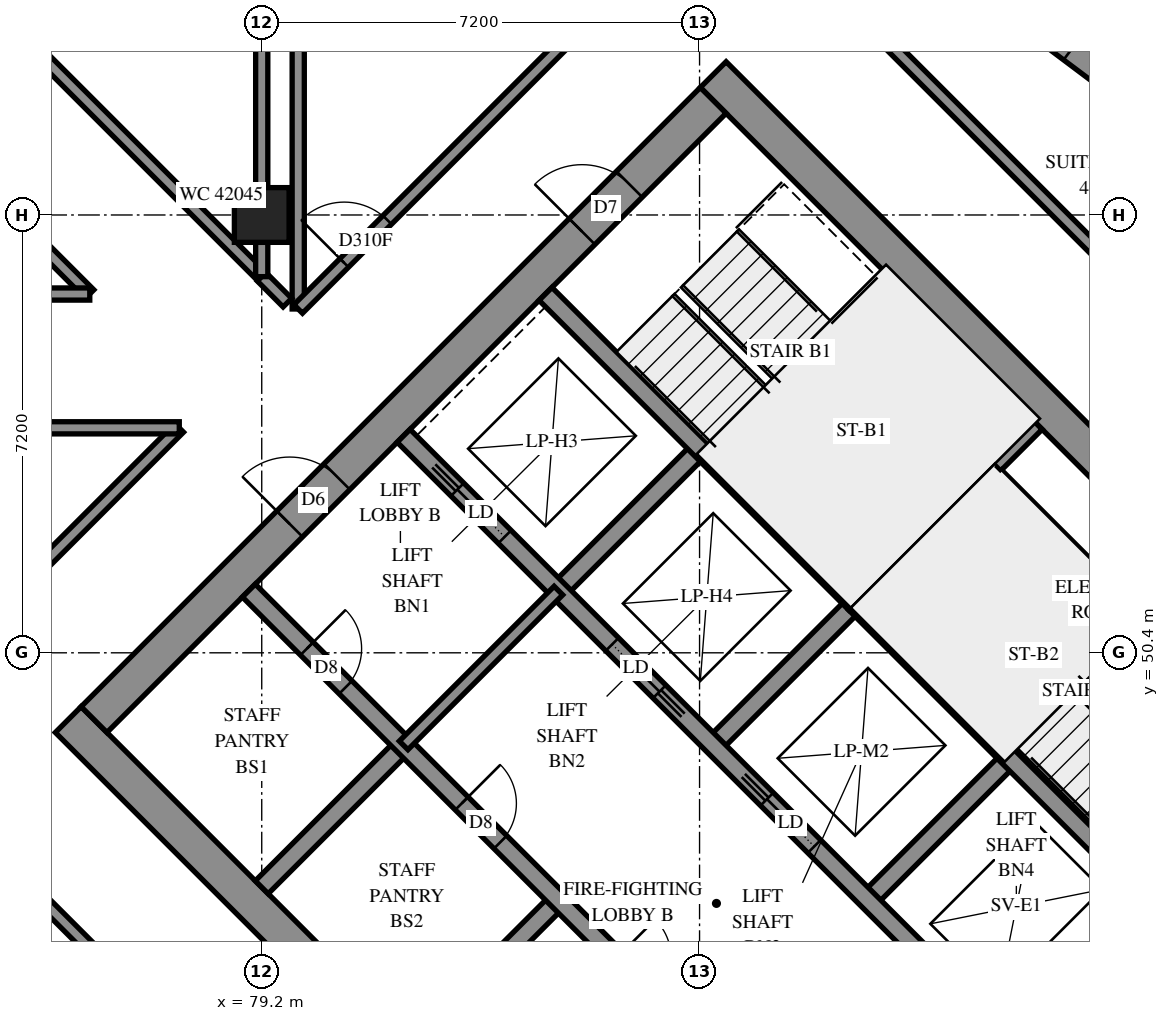
"""IFC4 building model, lengths in metres.
Left out: names, types, materials, properties, quantities, classifications, styles, units other than length and angle.
Written with IfcOpenShell. Run it as: python <this file> out.ifc"""

import sys

from ifc_helpers import new_model, si_unit, direction, frame, frame_2d, origin, origin_2d, place, context, subcontext, project, spatial, polyline, rectangle, outline, extrude, element, fill, save


model = new_model("IFC4")
c1 = context("Model", 3, precision=1e-05, world=origin(), true_north=direction((0.0, 1.0)))
c2 = subcontext(c1, "Body", "Model", "MODEL_VIEW")
j1 = project(units=[si_unit("LENGTHUNIT", "METRE"), si_unit("PLANEANGLEUNIT", "RADIAN")], contexts=[c1])
p1 = place(None, origin())
s1 = spatial("IfcSite", under=j1, at=p1, CompositionType="ELEMENT")
p2 = place(p1, origin())
s2 = spatial("IfcBuilding", under=s1, at=p2, CompositionType="ELEMENT")
p3 = place(p2, frame((0.0, 0.0, 155.8)))
s3 = spatial("IfcBuildingStorey", under=s2, at=p3, CompositionType="ELEMENT", Elevation=155.8)
p4 = place(p3, frame((79.2, 57.6, 0.0), z_axis=(0.0, 0.0, 1.0), x_axis=(1.0, 0.0, 0.0)))
e1 = element("IfcColumn", 1, at=p4, inside=s3, PredefinedType="COLUMN", context=c2, shape_type="SweptSolid", body=[
    extrude(rectangle(XDim=0.9, YDim=0.9, at=origin_2d()), origin(), (0.0, 0.0, 1.0), 3.1),
])
p5 = place(p3, frame((76.018, 49.302, -0.3), z_axis=(0.0, 0.0, 1.0), x_axis=(0.7071067812, -0.7071067812, 0.0)))
e2 = element("IfcWall", 2, at=p5, inside=s3, PredefinedType="SHEAR", context=c2, shape_type="SweptSolid", body=[
    extrude(rectangle(XDim=15.6, YDim=0.6, at=frame_2d((7.8, 0.0))), origin(), (0.0, 0.0, 1.0), 2.7),
])
p6 = place(p3, frame((86.625, 59.908, -0.3), z_axis=(0.0, 0.0, 1.0), x_axis=(0.7071067812, -0.7071067812, 0.0)))
e3 = element("IfcWall", 3, at=p6, inside=s3, PredefinedType="SHEAR", context=c2, shape_type="SweptSolid", body=[
    extrude(rectangle(XDim=15.6, YDim=0.6, at=frame_2d((7.8, 0.0))), origin(), (0.0, 0.0, 1.0), 2.7),
])
p7 = place(p6, frame((10.6, 0.0, 0.3)))
e4 = element("IfcOpeningElement", 4, at=p7, cuts=e3, PredefinedType="OPENING", context=c2, shape_type="SweptSolid", body=[
    extrude(rectangle(XDim=0.8, YDim=2.1, at=frame_2d((0.4, 1.05))), frame((0.0, 0.31, 0.0), z_axis=(0.0, -1.0, 0.0), x_axis=(1.0, 0.0, 0.0)), (0.0, 0.0, 1.0), 0.62),
])
p8 = place(p3, frame((76.442, 49.302, -0.3), z_axis=(0.0, 0.0, 1.0), x_axis=(0.7071067812, 0.7071067812, 0.0)))
e5 = element("IfcWall", 5, at=p8, inside=s3, PredefinedType="SHEAR", context=c2, shape_type="SweptSolid", body=[
    extrude(rectangle(XDim=14.4, YDim=0.6, at=frame_2d((7.2, 0.0))), origin(), (0.0, 0.0, 1.0), 2.7),
])
p9 = place(p8, frame((4.55, 0.0, 0.3)))
e6 = element("IfcOpeningElement", 6, at=p9, cuts=e5, PredefinedType="OPENING", context=c2, shape_type="SweptSolid", body=[
    extrude(rectangle(XDim=1.1, YDim=2.1, at=frame_2d((0.55, 1.05))), frame((0.0, 0.31, 0.0), z_axis=(0.0, -1.0, 0.0), x_axis=(1.0, 0.0, 0.0)), (0.0, 0.0, 1.0), 0.62),
])
p10 = place(p8, frame((11.35, 0.0, 0.3)))
e7 = element("IfcOpeningElement", 7, at=p10, cuts=e5, PredefinedType="OPENING", context=c2, shape_type="SweptSolid", body=[
    extrude(rectangle(XDim=1.1, YDim=2.1, at=frame_2d((0.55, 1.05))), frame((0.0, 0.31, 0.0), z_axis=(0.0, -1.0, 0.0), x_axis=(1.0, 0.0, 0.0)), (0.0, 0.0, 1.0), 0.62),
])
p11 = place(p3, frame((87.049, 38.695, -0.3), z_axis=(0.0, 0.0, 1.0), x_axis=(0.7071067812, 0.7071067812, 0.0)))
e8 = element("IfcWall", 8, at=p11, inside=s3, PredefinedType="SHEAR", context=c2, shape_type="SweptSolid", body=[
    extrude(rectangle(XDim=14.4, YDim=0.6, at=frame_2d((7.2, 0.0))), origin(), (0.0, 0.0, 1.0), 2.7),
])
p12 = place(p11, frame((4.55, 0.0, 0.3)))
e9 = element("IfcOpeningElement", 9, at=p12, cuts=e8, PredefinedType="OPENING", context=c2, shape_type="SweptSolid", body=[
    extrude(rectangle(XDim=1.1, YDim=2.1, at=frame_2d((0.55, 1.05))), frame((0.0, 0.31, 0.0), z_axis=(0.0, -1.0, 0.0), x_axis=(1.0, 0.0, 0.0)), (0.0, 0.0, 1.0), 0.62),
])
p13 = place(p11, frame((11.35, 0.0, 0.3)))
e10 = element("IfcOpeningElement", 10, at=p13, cuts=e8, PredefinedType="OPENING", context=c2, shape_type="SweptSolid", body=[
    extrude(rectangle(XDim=1.1, YDim=2.1, at=frame_2d((0.55, 1.05))), frame((0.0, 0.31, 0.0), z_axis=(0.0, -1.0, 0.0), x_axis=(1.0, 0.0, 0.0)), (0.0, 0.0, 1.0), 0.62),
])
for number, where, z_axis, x_axis in (
    (11, (79.2, 46.544, 0.0), (0.0, 0.0, 1.0), (0.707, 0.707, 0.0)),
    (12, (84.079, 51.423, 0.0), (0.0, 0.0, 1.0), (0.707, 0.707, 0.0)),
):
    element("IfcWall", number, at=place(p3, frame(where, z_axis=z_axis, x_axis=x_axis)), inside=s3, PredefinedType="SOLIDWALL", context=c2, shape_type="SweptSolid", body=[
        extrude(rectangle(XDim=3.3, YDim=0.3, at=frame_2d((1.65, 0.0))), origin(), (0.0, 0.0, 1.0), 3.1),
    ])
p14 = place(p3, frame((81.746, 43.999, 0.0), z_axis=(0.0, 0.0, 1.0), x_axis=(0.7071067812, 0.7071067812, 0.0)))
e13 = element("IfcWall", 13, at=p14, inside=s3, PredefinedType="SOLIDWALL", context=c2, shape_type="SweptSolid", body=[
    extrude(rectangle(XDim=3.3, YDim=0.3, at=frame_2d((1.65, 0.0))), origin(), (0.0, 0.0, 1.0), 3.1),
])
for number, where, z_axis, x_axis in (
    (14, (86.625, 48.878, 0.0), (0.0, 0.0, 1.0), (0.707, 0.707, 0.0)),
    (15, (89.17, 46.332, 0.0), (0.0, 0.0, 1.0), (0.707, 0.707, 0.0)),
):
    element("IfcWall", number, at=place(p3, frame(where, z_axis=z_axis, x_axis=x_axis)), inside=s3, PredefinedType="SOLIDWALL", context=c2, shape_type="SweptSolid", body=[
        extrude(rectangle(XDim=3.3, YDim=0.3, at=frame_2d((1.65, 0.0))), origin(), (0.0, 0.0, 1.0), 3.1),
    ])
p15 = place(p3, frame((78.988, 51.423, 0.0), z_axis=(0.0, 0.0, 1.0), x_axis=(0.7071067812, -0.7071067812, 0.0)))
e16 = element("IfcWall", 16, at=p15, inside=s3, PredefinedType="SOLIDWALL", context=c2, shape_type="SweptSolid", body=[
    extrude(rectangle(XDim=14.4, YDim=0.3, at=frame_2d((7.2, 0.0))), origin(), (0.0, 0.0, 1.0), 3.1),
])
p16 = place(p15, frame((1.35, 0.0, 0.0)))
e17 = element("IfcOpeningElement", 17, at=p16, cuts=e16, PredefinedType="OPENING", context=c2, shape_type="SweptSolid", body=[
    extrude(rectangle(XDim=0.9, YDim=2.1, at=frame_2d((0.45, 1.05))), frame((0.0, 0.16, 0.0), z_axis=(0.0, -1.0, 0.0), x_axis=(1.0, 0.0, 0.0)), (0.0, 0.0, 1.0), 0.32),
])
p17 = place(p15, frame((4.95, 0.0, 0.0)))
e18 = element("IfcOpeningElement", 18, at=p17, cuts=e16, PredefinedType="OPENING", context=c2, shape_type="SweptSolid", body=[
    extrude(rectangle(XDim=0.9, YDim=2.1, at=frame_2d((0.45, 1.05))), frame((0.0, 0.16, 0.0), z_axis=(0.0, -1.0, 0.0), x_axis=(1.0, 0.0, 0.0)), (0.0, 0.0, 1.0), 0.32),
])
p18 = place(p15, frame((8.55, 0.0, 0.0)))
e19 = element("IfcOpeningElement", 19, at=p18, cuts=e16, PredefinedType="OPENING", context=c2, shape_type="SweptSolid", body=[
    extrude(rectangle(XDim=0.9, YDim=2.1, at=frame_2d((0.45, 1.05))), frame((0.0, 0.16, 0.0), z_axis=(0.0, -1.0, 0.0), x_axis=(1.0, 0.0, 0.0)), (0.0, 0.0, 1.0), 0.32),
])
p19 = place(p15, frame((12.05, 0.0, 0.0)))
e20 = element("IfcOpeningElement", 20, at=p19, cuts=e16, PredefinedType="OPENING", context=c2, shape_type="SweptSolid", body=[
    extrude(rectangle(XDim=1.1, YDim=2.1, at=frame_2d((0.55, 1.05))), frame((0.0, 0.16, 0.0), z_axis=(0.0, -1.0, 0.0), x_axis=(1.0, 0.0, 0.0)), (0.0, 0.0, 1.0), 0.32),
])
p20 = place(p3, frame((81.534, 53.969, 0.0), z_axis=(0.0, 0.0, 1.0), x_axis=(0.707103309, -0.7071102534, 0.0)))
e21 = element("IfcWall", 21, at=p20, inside=s3, PredefinedType="SOLIDWALL", context=c2, shape_type="SweptSolid", body=[
    extrude(rectangle(XDim=14.4, YDim=0.3, at=frame_2d((7.2, 0.0))), origin(), (0.0, 0.0, 1.0), 3.1),
])
p21 = place(p20, frame((1.25, 0.0, 0.0)))
e22 = element("IfcOpeningElement", 22, at=p21, cuts=e21, PredefinedType="OPENING", context=c2, shape_type="SweptSolid", body=[
    extrude(rectangle(XDim=1.1, YDim=2.1, at=frame_2d((0.55, 1.05))), frame((0.0, 0.16, 0.0), z_axis=(0.0, -1.0, 0.0), x_axis=(1.0, 0.0, 0.0)), (0.0, 0.0, 1.0), 0.32),
])
p22 = place(p20, frame((4.85, 0.0, 0.0)))
e23 = element("IfcOpeningElement", 23, at=p22, cuts=e21, PredefinedType="OPENING", context=c2, shape_type="SweptSolid", body=[
    extrude(rectangle(XDim=1.1, YDim=2.1, at=frame_2d((0.55, 1.05))), frame((0.0, 0.16, 0.0), z_axis=(0.0, -1.0, 0.0), x_axis=(1.0, 0.0, 0.0)), (0.0, 0.0, 1.0), 0.32),
])
p23 = place(p20, frame((8.45, 0.0, 0.0)))
e24 = element("IfcOpeningElement", 24, at=p23, cuts=e21, PredefinedType="OPENING", context=c2, shape_type="SweptSolid", body=[
    extrude(rectangle(XDim=1.1, YDim=2.1, at=frame_2d((0.55, 1.05))), frame((0.0, 0.16, 0.0), z_axis=(0.0, -1.0, 0.0), x_axis=(1.0, 0.0, 0.0)), (0.0, 0.0, 1.0), 0.32),
])
p24 = place(p20, frame((12.05, 0.0, 0.0)))
e25 = element("IfcOpeningElement", 25, at=p24, cuts=e21, PredefinedType="OPENING", context=c2, shape_type="SweptSolid", body=[
    extrude(rectangle(XDim=1.1, YDim=2.1, at=frame_2d((0.55, 1.05))), frame((0.0, 0.16, 0.0), z_axis=(0.0, -1.0, 0.0), x_axis=(1.0, 0.0, 0.0)), (0.0, 0.0, 1.0), 0.32),
])
for number, where, z_axis, x_axis in (
    (26, (83.867, 56.302, 0.0), (0.0, 0.0, 1.0), (0.707, -0.707, 0.0)),
    (27, (88.958, 51.211, 0.0), (0.0, 0.0, 1.0), (0.707, -0.707, 0.0)),
):
    element("IfcWall", number, at=place(p3, frame(where, z_axis=z_axis, x_axis=x_axis)), inside=s3, PredefinedType="SOLIDWALL", context=c2, shape_type="SweptSolid", body=[
        extrude(rectangle(XDim=7.2, YDim=0.3, at=frame_2d((3.6, 0.0))), origin(), (0.0, 0.0, 1.0), 3.1),
    ])
p25 = place(p3, frame((88.958, 51.211, 0.0), z_axis=(0.0, 0.0, 1.0), x_axis=(0.7071067812, 0.7071067812, 0.0)))
e28 = element("IfcWall", 28, at=p25, inside=s3, PredefinedType="SOLIDWALL", context=c2, shape_type="SweptSolid", body=[
    extrude(rectangle(XDim=4.2, YDim=0.3, at=frame_2d((2.1, 0.0))), origin(), (0.0, 0.0, 1.0), 3.1),
])
p26 = place(p3, frame((93.877, 59.344, 0.0), z_axis=(0.0, 0.0, 1.0), x_axis=(-0.7998874743, 0.600150005, 0.0)))
e29 = element("IfcWall", 29, at=p26, inside=s3, PredefinedType="SOLIDWALL", context=c2, shape_type="SweptSolid", body=[
    extrude(outline(polyline([(-0.036, -0.25), (3.377, -0.25), (3.449, 0.25), (0.036, 0.25), (-0.036, -0.25)])), origin(), (0.0, 0.0, 1.0), 3.1),
])
p27 = place(p26, frame((1.677, 0.0, 0.45)))
e30 = element("IfcOpeningElement", 30, at=p27, cuts=e29, PredefinedType="OPENING", context=c2, shape_type="SweptSolid", body=[
    extrude(rectangle(XDim=1.2, YDim=2.5, at=frame_2d((0.6, 1.25))), frame((0.0, 0.26, 0.0), z_axis=(0.0, -1.0, 0.0), x_axis=(1.0, 0.0, 0.0)), (0.0, 0.0, 1.0), 0.52),
])
p28 = place(p3, frame((91.313, 53.354, 0.0), z_axis=(0.0, 0.0, 1.0), x_axis=(0.7071067812, -0.7071067812, 0.0)))
e31 = element("IfcWall", 31, at=p28, inside=s3, PredefinedType="PARTITIONING", context=c2, shape_type="SweptSolid", body=[
    extrude(rectangle(XDim=5.65, YDim=0.15, at=frame_2d((2.825, 0.0))), origin(), (0.0, 0.0, 1.0), 3.1),
])
p29 = place(p3, frame((81.534, 48.878, 0.0), z_axis=(0.0, 0.0, 1.0), x_axis=(0.707092892, 0.7071206701, 0.0)))
e32 = element("IfcWall", 32, at=p29, inside=s3, PredefinedType="PARTITIONING", context=c2, shape_type="SweptSolid", body=[
    extrude(rectangle(XDim=3.6, YDim=0.2, at=frame_2d((1.8, 0.0))), origin(), (0.0, 0.0, 1.0), 3.1),
])
p30 = place(p3, frame((86.841, 63.093, 0.0), z_axis=(0.0, 0.0, 1.0), x_axis=(0.7071067812, -0.7071067812, 0.0)))
e33 = element("IfcWall", 33, at=p30, inside=s3, PredefinedType="PARTITIONING", context=c2, shape_type="SweptSolid", body=[
    extrude(rectangle(XDim=12.239, YDim=0.2, at=frame_2d((6.119, 0.0))), origin(), (0.0, 0.0, 1.0), 3.1),
])
p31 = place(p30, frame((10.634, 0.0, 0.0)))
e34 = element("IfcOpeningElement", 34, at=p31, cuts=e33, PredefinedType="OPENING", context=c2, shape_type="SweptSolid", body=[
    extrude(rectangle(XDim=0.9, YDim=2.1, at=frame_2d((0.45, 1.05))), frame((0.0, 0.11, 0.0), z_axis=(0.0, -1.0, 0.0), x_axis=(1.0, 0.0, 0.0)), (0.0, 0.0, 1.0), 0.22),
])
p32 = place(p3, frame((79.8, 56.054, 0.0), z_axis=(0.0, 0.0, 1.0), x_axis=(0.0, 1.0, 0.0)))
e35 = element("IfcWall", 35, at=p32, inside=s3, PredefinedType="PARTITIONING", context=c2, shape_type="SweptSolid", body=[
    extrude(rectangle(XDim=11.454, YDim=0.2, at=frame_2d((5.727, 0.0))), origin(), (0.0, 0.0, 1.0), 3.1),
])
p33 = place(p3, frame((79.799, 56.055, 0.0), z_axis=(0.0, 0.0, 1.0), x_axis=(0.7071067812, 0.7071067812, 0.0)))
e36 = element("IfcWall", 36, at=p33, inside=s3, PredefinedType="PARTITIONING", context=c2, shape_type="SweptSolid", body=[
    extrude(rectangle(XDim=9.95, YDim=0.2, at=frame_2d((4.975, 0.0))), origin(), (0.0, 0.0, 1.0), 3.1),
])
p34 = place(p33, frame((1.071, 0.0, 0.0)))
e37 = element("IfcOpeningElement", 37, at=p34, cuts=e36, PredefinedType="OPENING", context=c2, shape_type="SweptSolid", body=[
    extrude(rectangle(XDim=1.0, YDim=2.1, at=frame_2d((0.5, 1.05))), frame((0.0, 0.11, 0.0), z_axis=(0.0, -1.0, 0.0), x_axis=(1.0, 0.0, 0.0)), (0.0, 0.0, 1.0), 0.22),
])
p35 = place(p3, frame((74.903, 60.889, 0.0), z_axis=(0.0, 0.0, 1.0), x_axis=(0.7071067812, -0.7071067812, 0.0)))
e38 = element("IfcWall", 38, at=p35, inside=s3, PredefinedType="PARTITIONING", context=c2, shape_type="SweptSolid", body=[
    extrude(rectangle(XDim=6.081, YDim=0.2, at=frame_2d((3.041, 0.0))), origin(), (0.0, 0.0, 1.0), 3.1),
])
p36 = place(p3, frame((74.223, 47.697, 0.0), z_axis=(0.0, 0.0, 1.0), x_axis=(0.7071067812, -0.7071067812, 0.0)))
e39 = element("IfcWall", 39, at=p36, inside=s3, PredefinedType="PARTITIONING", context=c2, shape_type="SweptSolid", body=[
    extrude(rectangle(XDim=4.63, YDim=0.2, at=frame_2d((2.315, 0.0))), origin(), (0.0, 0.0, 1.0), 3.1),
])
p37 = place(p36, frame((0.434, 0.0, 0.0)))
e40 = element("IfcOpeningElement", 40, at=p37, cuts=e39, PredefinedType="OPENING", context=c2, shape_type="SweptSolid", body=[
    extrude(rectangle(XDim=1.0, YDim=2.1, at=frame_2d((0.5, 1.05))), frame((0.0, 0.11, 0.0), z_axis=(0.0, -1.0, 0.0), x_axis=(1.0, 0.0, 0.0)), (0.0, 0.0, 1.0), 0.22),
])
p38 = place(p3, frame((74.701, 50.957, 0.0), z_axis=(0.0, 0.0, 1.0), x_axis=(0.7071067812, 0.7071067812, 0.0)))
e41 = element("IfcWall", 41, at=p38, inside=s3, PredefinedType="PARTITIONING", context=c2, shape_type="SweptSolid", body=[
    extrude(rectangle(XDim=4.444, YDim=0.2, at=frame_2d((2.222, 0.0))), origin(), (0.0, 0.0, 1.0), 3.1),
])
p39 = place(p3, frame((79.2, 58.05, 0.0), z_axis=(0.0, 0.0, 1.0), x_axis=(0.0, 1.0, 0.0)))
e42 = element("IfcWall", 42, at=p39, inside=s3, PredefinedType="PARTITIONING", context=c2, shape_type="SweptSolid", body=[
    extrude(rectangle(XDim=3.25, YDim=0.2, at=frame_2d((1.625, 0.0))), origin(), (0.0, 0.0, 1.0), 3.1),
])
p40 = place(p3, frame((74.702, 54.1, 0.0), z_axis=(0.0, 0.0, 1.0), x_axis=(1.0, 0.0, 0.0)))
e43 = element("IfcWall", 43, at=p40, inside=s3, PredefinedType="PARTITIONING", context=c2, shape_type="SweptSolid", body=[
    extrude(rectangle(XDim=3.142, YDim=0.2, at=frame_2d((1.571, 0.0))), origin(), (0.0, 0.0, 1.0), 3.1),
])
p41 = place(p3, frame((74.699, 57.969, 0.0), z_axis=(0.0, 0.0, 1.0), x_axis=(0.7071067812, -0.7071067812, 0.0)))
e44 = element("IfcWall", 44, at=p41, inside=s3, PredefinedType="PARTITIONING", context=c2, shape_type="SweptSolid", body=[
    extrude(rectangle(XDim=2.362, YDim=0.2, at=frame_2d((1.181, 0.0))), origin(), (0.0, 0.0, 1.0), 3.1),
])
p42 = place(p3, frame((74.702, 56.3, 0.0), z_axis=(0.0, 0.0, 1.0), x_axis=(1.0, 0.0, 0.0)))
e45 = element("IfcWall", 45, at=p42, inside=s3, PredefinedType="PARTITIONING", context=c2, shape_type="SweptSolid", body=[
    extrude(rectangle(XDim=1.67, YDim=0.2, at=frame_2d((0.835, 0.0))), origin(), (0.0, 0.0, 1.0), 3.1),
])
p43 = place(p3, frame((79.198, 56.584, 0.0), z_axis=(0.0, 0.0, 1.0), x_axis=(0.7054410477, -0.7087685999, 0.0)))
e46 = element("IfcWall", 46, at=p43, inside=s3, PredefinedType="PARTITIONING", context=c2, shape_type="SweptSolid", body=[
    extrude(rectangle(XDim=0.601, YDim=0.2, at=frame_2d((0.3, 0.0))), origin(), (0.0, 0.0, 1.0), 3.1),
])
p44 = place(p3, frame((79.2, 56.586, 0.0), z_axis=(0.0, 0.0, 1.0), x_axis=(0.0, 1.0, 0.0)))
e47 = element("IfcWall", 47, at=p44, inside=s3, PredefinedType="PARTITIONING", context=c2, shape_type="SweptSolid", body=[
    extrude(rectangle(XDim=0.564, YDim=0.2, at=frame_2d((0.282, 0.0))), origin(), (0.0, 0.0, 1.0), 3.1),
])
p45 = place(p27, origin())
e48 = element("IfcWindow", 48, at=p45, inside=s3, PartitioningType="SINGLE_PANEL", PredefinedType="WINDOW", context=c2, shape_type="SweptSolid", body=[
    extrude(rectangle(XDim=1.2, YDim=2.5, at=frame_2d((0.6, 1.25))), frame((0.0, 0.18, 0.0), z_axis=(0.0, -1.0, 0.0), x_axis=(1.0, 0.0, 0.0)), (0.0, 0.0, 1.0), 0.06),
])
fill(e30, e48)
p46 = place(p9, origin())
e49 = element("IfcDoor", 49, at=p46, inside=s3, OperationType="DOUBLE_DOOR_SINGLE_SWING", PredefinedType="DOOR", context=c2, shape_type="SweptSolid", body=[
    extrude(rectangle(XDim=1.1, YDim=2.1, at=frame_2d((0.55, 1.05))), frame((0.0, 0.025, 0.0), z_axis=(0.0, -1.0, 0.0), x_axis=(1.0, 0.0, 0.0)), (0.0, 0.0, 1.0), 0.05),
])
fill(e6, e49)
p47 = place(p10, origin())
e50 = element("IfcDoor", 50, at=p47, inside=s3, OperationType="SINGLE_SWING_LEFT", PredefinedType="DOOR", context=c2, shape_type="SweptSolid", body=[
    extrude(rectangle(XDim=1.1, YDim=2.1, at=frame_2d((0.55, 1.05))), frame((0.0, 0.025, 0.0), z_axis=(0.0, -1.0, 0.0), x_axis=(1.0, 0.0, 0.0)), (0.0, 0.0, 1.0), 0.05),
])
fill(e7, e50)
p48 = place(p16, origin())
e51 = element("IfcDoor", 51, at=p48, inside=s3, OperationType="SINGLE_SWING_LEFT", PredefinedType="DOOR", context=c2, shape_type="SweptSolid", body=[
    extrude(rectangle(XDim=0.9, YDim=2.1, at=frame_2d((0.45, 1.05))), frame((0.0, 0.025, 0.0), z_axis=(0.0, -1.0, 0.0), x_axis=(1.0, 0.0, 0.0)), (0.0, 0.0, 1.0), 0.05),
])
fill(e17, e51)
p49 = place(p17, origin())
e52 = element("IfcDoor", 52, at=p49, inside=s3, OperationType="SINGLE_SWING_LEFT", PredefinedType="DOOR", context=c2, shape_type="SweptSolid", body=[
    extrude(rectangle(XDim=0.9, YDim=2.1, at=frame_2d((0.45, 1.05))), frame((0.0, 0.025, 0.0), z_axis=(0.0, -1.0, 0.0), x_axis=(1.0, 0.0, 0.0)), (0.0, 0.0, 1.0), 0.05),
])
fill(e18, e52)
p50 = place(p21, origin())
e53 = element("IfcDoor", 53, at=p50, inside=s3, OperationType="SLIDING_TO_LEFT", PredefinedType="DOOR", context=c2, shape_type="SweptSolid", body=[
    extrude(rectangle(XDim=1.1, YDim=2.1, at=frame_2d((0.55, 1.05))), frame((0.0, 0.025, 0.0), z_axis=(0.0, -1.0, 0.0), x_axis=(1.0, 0.0, 0.0)), (0.0, 0.0, 1.0), 0.05),
])
fill(e22, e53)
p51 = place(p22, origin())
e54 = element("IfcDoor", 54, at=p51, inside=s3, OperationType="SLIDING_TO_RIGHT", PredefinedType="DOOR", context=c2, shape_type="SweptSolid", body=[
    extrude(rectangle(XDim=1.1, YDim=2.1, at=frame_2d((0.55, 1.05))), frame((0.0, 0.025, 0.0), z_axis=(0.0, -1.0, 0.0), x_axis=(1.0, 0.0, 0.0)), (0.0, 0.0, 1.0), 0.05),
])
fill(e23, e54)
p52 = place(p23, origin())
e55 = element("IfcDoor", 55, at=p52, inside=s3, OperationType="SLIDING_TO_LEFT", PredefinedType="DOOR", context=c2, shape_type="SweptSolid", body=[
    extrude(rectangle(XDim=1.1, YDim=2.1, at=frame_2d((0.55, 1.05))), frame((0.0, 0.025, 0.0), z_axis=(0.0, -1.0, 0.0), x_axis=(1.0, 0.0, 0.0)), (0.0, 0.0, 1.0), 0.05),
])
fill(e24, e55)
p53 = place(p34, origin())
e56 = element("IfcDoor", 56, at=p53, inside=s3, OperationType="SINGLE_SWING_RIGHT", PredefinedType="DOOR", context=c2, shape_type="SweptSolid", body=[
    extrude(rectangle(XDim=1.0, YDim=2.1, at=frame_2d((0.5, 1.05))), frame((0.0, 0.025, 0.0), z_axis=(0.0, -1.0, 0.0), x_axis=(1.0, 0.0, 0.0)), (0.0, 0.0, 1.0), 0.05),
])
fill(e37, e56)
save(model, sys.argv[1])
